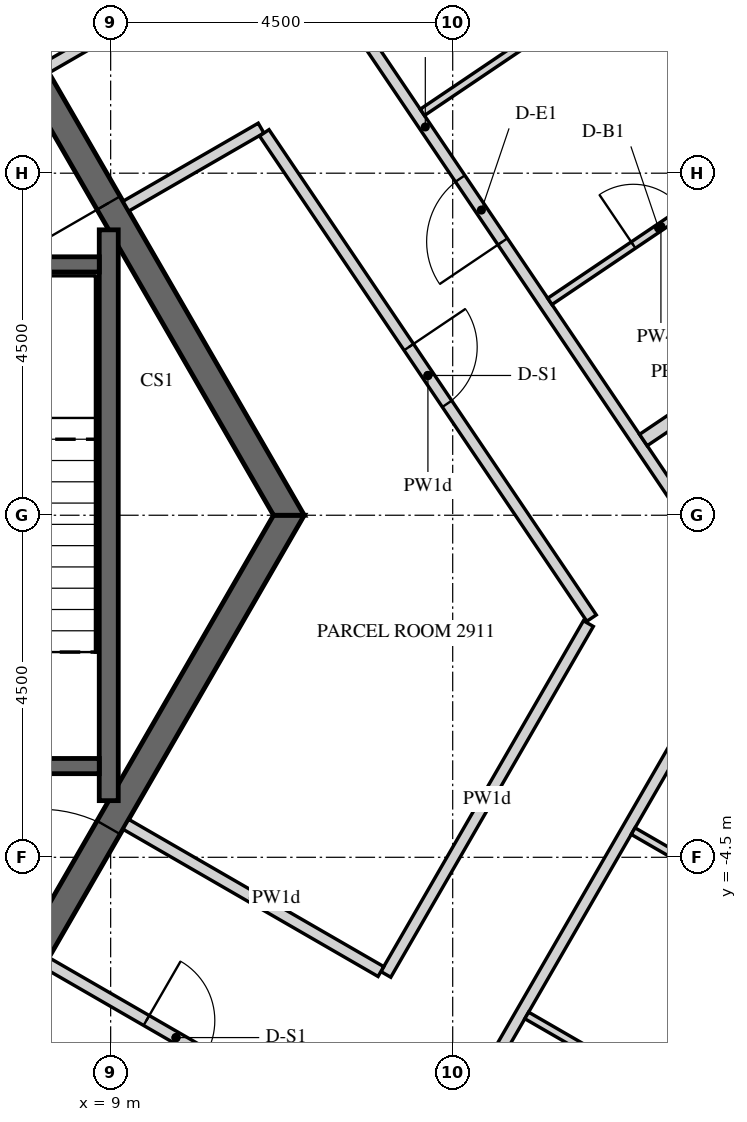
"""IFC4 building model, lengths in metres.
Left out: names, types, materials, properties, quantities, classifications, styles, units other than length and angle.
Written with IfcOpenShell. Run it as: python <this file> out.ifc"""

import sys

from ifc_helpers import new_model, si_unit, direction, frame, frame_2d, origin, place, context, subcontext, project, spatial, polyline, rectangle, outline, extrude, element, fill, save


model = new_model("IFC4")
c1 = context("Model", 3, precision=1e-05, world=origin(), true_north=direction((0.0, 1.0)))
c2 = subcontext(c1, "Body", "Model", "MODEL_VIEW")
j1 = project(units=[si_unit("LENGTHUNIT", "METRE"), si_unit("PLANEANGLEUNIT", "RADIAN")], contexts=[c1])
p1 = place(None, origin())
s1 = spatial("IfcSite", under=j1, at=p1, CompositionType="ELEMENT")
p2 = place(p1, origin())
s2 = spatial("IfcBuilding", under=s1, at=p2, CompositionType="ELEMENT")
p3 = place(p2, frame((0.0, 0.0, 372.9)))
s3 = spatial("IfcBuildingStorey", under=s2, at=p3, CompositionType="ELEMENT", Elevation=372.9)
p4 = place(p3, frame((15.273, -21.097, -0.15), z_axis=(0.0, 0.0, 1.0), x_axis=(0.499997453958, 0.866026873738, 0.0)))
e1 = element("IfcWall", 1, at=p4, inside=s3, PredefinedType="SOLIDWALL", context=c2, shape_type="SweptSolid", body=[
    extrude(outline(polyline([(-0.018, -0.225), (23.152, -0.225), (23.11, 0.225), (0.018, 0.225), (-0.018, -0.225)])), origin(), (0.0, 0.0, 1.0), 3.55),
])
p5 = place(p4, frame((1.366, 0.0, 0.45)))
e2 = element("IfcOpeningElement", 2, at=p5, cuts=e1, PredefinedType="OPENING", context=c2, shape_type="SweptSolid", body=[
    extrude(rectangle(XDim=2.4, YDim=3.0, at=frame_2d((1.2, 1.5))), frame((0.0, 0.235, 0.0), z_axis=(0.0, -1.0, 0.0), x_axis=(1.0, 0.0, 0.0)), (0.0, 0.0, 1.0), 0.47),
])
p6 = place(p4, frame((4.966, 0.0, 0.45)))
e3 = element("IfcOpeningElement", 3, at=p6, cuts=e1, PredefinedType="OPENING", context=c2, shape_type="SweptSolid", body=[
    extrude(rectangle(XDim=2.4, YDim=3.0, at=frame_2d((1.2, 1.5))), frame((0.0, 0.235, 0.0), z_axis=(0.0, -1.0, 0.0), x_axis=(1.0, 0.0, 0.0)), (0.0, 0.0, 1.0), 0.47),
])
p7 = place(p4, frame((8.566, 0.0, 0.45)))
e4 = element("IfcOpeningElement", 4, at=p7, cuts=e1, PredefinedType="OPENING", context=c2, shape_type="SweptSolid", body=[
    extrude(rectangle(XDim=2.4, YDim=3.0, at=frame_2d((1.2, 1.5))), frame((0.0, 0.235, 0.0), z_axis=(0.0, -1.0, 0.0), x_axis=(1.0, 0.0, 0.0)), (0.0, 0.0, 1.0), 0.47),
])
p8 = place(p4, frame((12.166, 0.0, 0.45)))
e5 = element("IfcOpeningElement", 5, at=p8, cuts=e1, PredefinedType="OPENING", context=c2, shape_type="SweptSolid", body=[
    extrude(rectangle(XDim=2.4, YDim=3.0, at=frame_2d((1.2, 1.5))), frame((0.0, 0.235, 0.0), z_axis=(0.0, -1.0, 0.0), x_axis=(1.0, 0.0, 0.0)), (0.0, 0.0, 1.0), 0.47),
])
p9 = place(p4, frame((15.766, 0.0, 0.45)))
e6 = element("IfcOpeningElement", 6, at=p9, cuts=e1, PredefinedType="OPENING", context=c2, shape_type="SweptSolid", body=[
    extrude(rectangle(XDim=2.4, YDim=3.0, at=frame_2d((1.2, 1.5))), frame((0.0, 0.235, 0.0), z_axis=(0.0, -1.0, 0.0), x_axis=(1.0, 0.0, 0.0)), (0.0, 0.0, 1.0), 0.47),
])
p10 = place(p4, frame((19.366, 0.0, 0.45)))
e7 = element("IfcOpeningElement", 7, at=p10, cuts=e1, PredefinedType="OPENING", context=c2, shape_type="SweptSolid", body=[
    extrude(rectangle(XDim=2.4, YDim=3.0, at=frame_2d((1.2, 1.5))), frame((0.0, 0.235, 0.0), z_axis=(0.0, -1.0, 0.0), x_axis=(1.0, 0.0, 0.0)), (0.0, 0.0, 1.0), 0.47),
])
p11 = place(p3, frame((24.37, 2.811, -0.15), z_axis=(0.0, 0.0, 1.0), x_axis=(-0.559187034749, 0.829041531027, 0.0)))
e8 = element("IfcWall", 8, at=p11, inside=s3, PredefinedType="SOLIDWALL", context=c2, shape_type="SweptSolid", body=[
    extrude(outline(polyline([(0.225, -0.225), (20.506, -0.225), (20.957, 0.225), (-0.225, 0.225), (0.225, -0.225)])), origin(), (0.0, 0.0, 1.0), 3.55),
])
p12 = place(p11, frame((0.325, 0.0, 1.05)))
e9 = element("IfcOpeningElement", 9, at=p12, cuts=e8, PredefinedType="OPENING", context=c2, shape_type="SweptSolid", body=[
    extrude(rectangle(XDim=0.9, YDim=1.5, at=frame_2d((0.45, 0.75))), frame((0.0, 0.235, 0.0), z_axis=(0.0, -1.0, 0.0), x_axis=(1.0, 0.0, 0.0)), (0.0, 0.0, 1.0), 0.47),
])
p13 = place(p11, frame((1.525, 0.0, 0.15)))
e10 = element("IfcOpeningElement", 10, at=p13, cuts=e8, PredefinedType="OPENING", context=c2, shape_type="SweptSolid", body=[
    extrude(rectangle(XDim=1.2, YDim=2.4, at=frame_2d((0.6, 1.2))), frame((0.0, 0.235, 0.0), z_axis=(0.0, -1.0, 0.0), x_axis=(1.0, 0.0, 0.0)), (0.0, 0.0, 1.0), 0.47),
])
p14 = place(p11, frame((3.766, 0.0, 1.05)))
e11 = element("IfcOpeningElement", 11, at=p14, cuts=e8, PredefinedType="OPENING", context=c2, shape_type="SweptSolid", body=[
    extrude(rectangle(XDim=0.9, YDim=1.5, at=frame_2d((0.45, 0.75))), frame((0.0, 0.235, 0.0), z_axis=(0.0, -1.0, 0.0), x_axis=(1.0, 0.0, 0.0)), (0.0, 0.0, 1.0), 0.47),
])
p15 = place(p11, frame((4.966, 0.0, 0.15)))
e12 = element("IfcOpeningElement", 12, at=p15, cuts=e8, PredefinedType="OPENING", context=c2, shape_type="SweptSolid", body=[
    extrude(rectangle(XDim=1.2, YDim=2.4, at=frame_2d((0.6, 1.2))), frame((0.0, 0.235, 0.0), z_axis=(0.0, -1.0, 0.0), x_axis=(1.0, 0.0, 0.0)), (0.0, 0.0, 1.0), 0.47),
])
p16 = place(p11, frame((7.366, 0.0, 1.05)))
e13 = element("IfcOpeningElement", 13, at=p16, cuts=e8, PredefinedType="OPENING", context=c2, shape_type="SweptSolid", body=[
    extrude(rectangle(XDim=0.9, YDim=1.5, at=frame_2d((0.45, 0.75))), frame((0.0, 0.235, 0.0), z_axis=(0.0, -1.0, 0.0), x_axis=(1.0, 0.0, 0.0)), (0.0, 0.0, 1.0), 0.47),
])
p17 = place(p11, frame((8.566, 0.0, 0.15)))
e14 = element("IfcOpeningElement", 14, at=p17, cuts=e8, PredefinedType="OPENING", context=c2, shape_type="SweptSolid", body=[
    extrude(rectangle(XDim=1.2, YDim=2.4, at=frame_2d((0.6, 1.2))), frame((0.0, 0.235, 0.0), z_axis=(0.0, -1.0, 0.0), x_axis=(1.0, 0.0, 0.0)), (0.0, 0.0, 1.0), 0.47),
])
p18 = place(p11, frame((10.966, 0.0, 1.05)))
e15 = element("IfcOpeningElement", 15, at=p18, cuts=e8, PredefinedType="OPENING", context=c2, shape_type="SweptSolid", body=[
    extrude(rectangle(XDim=0.9, YDim=1.5, at=frame_2d((0.45, 0.75))), frame((0.0, 0.235, 0.0), z_axis=(0.0, -1.0, 0.0), x_axis=(1.0, 0.0, 0.0)), (0.0, 0.0, 1.0), 0.47),
])
p19 = place(p11, frame((12.166, 0.0, 0.15)))
e16 = element("IfcOpeningElement", 16, at=p19, cuts=e8, PredefinedType="OPENING", context=c2, shape_type="SweptSolid", body=[
    extrude(rectangle(XDim=1.2, YDim=2.4, at=frame_2d((0.6, 1.2))), frame((0.0, 0.235, 0.0), z_axis=(0.0, -1.0, 0.0), x_axis=(1.0, 0.0, 0.0)), (0.0, 0.0, 1.0), 0.47),
])
p20 = place(p11, frame((14.566, 0.0, 1.05)))
e17 = element("IfcOpeningElement", 17, at=p20, cuts=e8, PredefinedType="OPENING", context=c2, shape_type="SweptSolid", body=[
    extrude(rectangle(XDim=0.9, YDim=1.5, at=frame_2d((0.45, 0.75))), frame((0.0, 0.235, 0.0), z_axis=(0.0, -1.0, 0.0), x_axis=(1.0, 0.0, 0.0)), (0.0, 0.0, 1.0), 0.47),
])
p21 = place(p11, frame((15.766, 0.0, 0.15)))
e18 = element("IfcOpeningElement", 18, at=p21, cuts=e8, PredefinedType="OPENING", context=c2, shape_type="SweptSolid", body=[
    extrude(rectangle(XDim=1.2, YDim=2.4, at=frame_2d((0.6, 1.2))), frame((0.0, 0.235, 0.0), z_axis=(0.0, -1.0, 0.0), x_axis=(1.0, 0.0, 0.0)), (0.0, 0.0, 1.0), 0.47),
])
p22 = place(p11, frame((18.007, 0.0, 1.05)))
e19 = element("IfcOpeningElement", 19, at=p22, cuts=e8, PredefinedType="OPENING", context=c2, shape_type="SweptSolid", body=[
    extrude(rectangle(XDim=0.9, YDim=1.5, at=frame_2d((0.45, 0.75))), frame((0.0, 0.235, 0.0), z_axis=(0.0, -1.0, 0.0), x_axis=(1.0, 0.0, 0.0)), (0.0, 0.0, 1.0), 0.47),
])
p23 = place(p11, frame((19.207, 0.0, 0.15)))
e20 = element("IfcOpeningElement", 20, at=p23, cuts=e8, PredefinedType="OPENING", context=c2, shape_type="SweptSolid", body=[
    extrude(rectangle(XDim=1.2, YDim=2.4, at=frame_2d((0.6, 1.2))), frame((0.0, 0.235, 0.0), z_axis=(0.0, -1.0, 0.0), x_axis=(1.0, 0.0, 0.0)), (0.0, 0.0, 1.0), 0.47),
])
p24 = place(p3, frame((5.673, -9.825, -0.15), z_axis=(0.0, 0.0, 1.0), x_axis=(0.499995046907, 0.866028263435, 0.0)))
e21 = element("IfcWall", 21, at=p24, inside=s3, PredefinedType="SHEAR", context=c2, shape_type="SweptSolid", body=[
    extrude(outline(polyline([(-0.101, -0.175), (11.446, -0.175), (11.244, 0.175), (0.101, 0.175), (-0.101, -0.175)])), origin(), (0.0, 0.0, 1.0), 3.55),
])
p25 = place(p24, frame((4.801, 0.0, 0.15)))
e22 = element("IfcOpeningElement", 22, at=p25, cuts=e21, PredefinedType="OPENING", context=c2, shape_type="SweptSolid", body=[
    extrude(rectangle(XDim=1.8, YDim=2.4, at=frame_2d((0.9, 1.2))), frame((0.0, 0.185, 0.0), z_axis=(0.0, -1.0, 0.0), x_axis=(1.0, 0.0, 0.0)), (0.0, 0.0, 1.0), 0.37),
])
p26 = place(p3, frame((11.345, 0.0, -0.15), z_axis=(0.0, 0.0, 1.0), x_axis=(-0.499995046907, 0.866028263435, 0.0)))
e23 = element("IfcWall", 23, at=p26, inside=s3, PredefinedType="SHEAR", context=c2, shape_type="SweptSolid", body=[
    extrude(outline(polyline([(-0.101, -0.175), (11.446, -0.175), (11.244, 0.175), (0.101, 0.175), (-0.101, -0.175)])), origin(), (0.0, 0.0, 1.0), 3.55),
])
p27 = place(p26, frame((4.744, 0.0, 0.15)))
e24 = element("IfcOpeningElement", 24, at=p27, cuts=e23, PredefinedType="OPENING", context=c2, shape_type="SweptSolid", body=[
    extrude(rectangle(XDim=1.8, YDim=2.4, at=frame_2d((0.9, 1.2))), frame((0.0, 0.185, 0.0), z_axis=(0.0, -1.0, 0.0), x_axis=(1.0, 0.0, 0.0)), (0.0, 0.0, 1.0), 0.37),
])
p28 = place(p3, frame((8.975, -3.755, -0.25), z_axis=(0.0, 0.0, 1.0), x_axis=(0.0, 1.0, 0.0)))
e25 = element("IfcWall", 25, at=p28, inside=s3, PredefinedType="SHEAR", context=c2, shape_type="SweptSolid", body=[
    extrude(rectangle(XDim=7.51, YDim=0.25, at=frame_2d((3.755, 0.0))), origin(), (0.0, 0.0, 1.0), 3.9),
])
p29 = place(p3, frame((5.9, 3.3, -0.25), z_axis=(0.0, 0.0, 1.0), x_axis=(1.0, 0.0, 0.0)))
e26 = element("IfcWall", 26, at=p29, inside=s3, PredefinedType="SHEAR", context=c2, shape_type="SweptSolid", body=[
    extrude(rectangle(XDim=2.95, YDim=0.2, at=frame_2d((1.475, 0.0))), origin(), (0.0, 0.0, 1.0), 3.9),
])
p30 = place(p3, frame((5.9, -3.3, -0.25), z_axis=(0.0, 0.0, 1.0), x_axis=(1.0, 0.0, 0.0)))
e27 = element("IfcWall", 27, at=p30, inside=s3, PredefinedType="SHEAR", context=c2, shape_type="SweptSolid", body=[
    extrude(rectangle(XDim=2.95, YDim=0.2, at=frame_2d((1.475, 0.0))), origin(), (0.0, 0.0, 1.0), 3.9),
])
p31 = place(p30, frame((0.875, 0.0, 0.25)))
e28 = element("IfcOpeningElement", 28, at=p31, cuts=e27, PredefinedType="OPENING", context=c2, shape_type="SweptSolid", body=[
    extrude(rectangle(XDim=1.2, YDim=2.4, at=frame_2d((0.6, 1.2))), frame((0.0, 0.11, 0.0), z_axis=(0.0, -1.0, 0.0), x_axis=(1.0, 0.0, 0.0)), (0.0, 0.0, 1.0), 0.22),
])
p32 = place(p3, frame((10.697, -12.973, 0.0), z_axis=(0.0, 0.0, 1.0), x_axis=(0.499991115059, 0.866030533446, 0.0)))
e29 = element("IfcWall", 29, at=p32, inside=s3, PredefinedType="PARTITIONING", context=c2, shape_type="SweptSolid", body=[
    extrude(rectangle(XDim=13.504, YDim=0.15, at=frame_2d((6.752, 0.0))), origin(), (0.0, 0.0, 1.0), 2.47),
])
p33 = place(p32, frame((3.175, 0.0, 0.0)))
e30 = element("IfcOpeningElement", 30, at=p33, cuts=e29, PredefinedType="OPENING", context=c2, shape_type="SweptSolid", body=[
    extrude(rectangle(XDim=1.0, YDim=2.1, at=frame_2d((0.5, 1.05))), frame((0.0, 0.085, 0.0), z_axis=(0.0, -1.0, 0.0), x_axis=(1.0, 0.0, 0.0)), (0.0, 0.0, 1.0), 0.17),
])
p34 = place(p3, frame((17.401, -1.21, 0.0), z_axis=(0.0, 0.0, 1.0), x_axis=(-0.559186729505, 0.829041736914, 0.0)))
e31 = element("IfcWall", 31, at=p34, inside=s3, PredefinedType="PARTITIONING", context=c2, shape_type="SweptSolid", body=[
    extrude(rectangle(XDim=15.243, YDim=0.15, at=frame_2d((7.621, 0.0))), origin(), (0.0, 0.0, 1.0), 2.47),
])
p35 = place(p34, frame((5.802, 0.0, 0.0)))
e32 = element("IfcOpeningElement", 32, at=p35, cuts=e31, PredefinedType="OPENING", context=c2, shape_type="SweptSolid", body=[
    extrude(rectangle(XDim=1.0, YDim=2.1, at=frame_2d((0.5, 1.05))), frame((0.0, 0.085, 0.0), z_axis=(0.0, -1.0, 0.0), x_axis=(1.0, 0.0, 0.0)), (0.0, 0.0, 1.0), 0.17),
])
p36 = place(p3, frame((9.2, 4.066, 0.0), z_axis=(0.0, 0.0, 1.0), x_axis=(0.866011447264, 0.500024172624, 0.0)))
e33 = element("IfcWall", 33, at=p36, inside=s3, PredefinedType="PARTITIONING", context=c2, shape_type="SweptSolid", body=[
    extrude(rectangle(XDim=2.055, YDim=0.15, at=frame_2d((1.027, 0.0))), origin(), (0.0, 0.0, 1.0), 2.47),
])
p37 = place(p3, frame((11.021, 5.031, 0.0), z_axis=(0.0, 0.0, 1.0), x_axis=(0.559191842266, -0.829038288346, 0.0)))
e34 = element("IfcWall", 34, at=p37, inside=s3, PredefinedType="PARTITIONING", context=c2, shape_type="SweptSolid", body=[
    extrude(rectangle(XDim=7.7, YDim=0.15, at=frame_2d((3.85, 0.0))), origin(), (0.0, 0.0, 1.0), 2.47),
])
p38 = place(p37, frame((3.4, 0.0, 0.0)))
e35 = element("IfcOpeningElement", 35, at=p38, cuts=e34, PredefinedType="OPENING", context=c2, shape_type="SweptSolid", body=[
    extrude(rectangle(XDim=0.9, YDim=2.1, at=frame_2d((0.45, 1.05))), frame((0.0, 0.085, 0.0), z_axis=(0.0, -1.0, 0.0), x_axis=(1.0, 0.0, 0.0)), (0.0, 0.0, 1.0), 0.17),
])
p39 = place(p3, frame((15.285, -1.425, 0.0), z_axis=(0.0, 0.0, 1.0), x_axis=(-0.499972278664, -0.866041408113, 0.0)))
e36 = element("IfcWall", 36, at=p39, inside=s3, PredefinedType="PARTITIONING", context=c2, shape_type="SweptSolid", body=[
    extrude(rectangle(XDim=5.329, YDim=0.15, at=frame_2d((2.665, 0.0))), origin(), (0.0, 0.0, 1.0), 2.47),
])
p40 = place(p3, frame((12.555, -6.003, 0.0), z_axis=(0.0, 0.0, 1.0), x_axis=(-0.866016658288, 0.500015147339, 0.0)))
e37 = element("IfcWall", 37, at=p40, inside=s3, PredefinedType="PARTITIONING", context=c2, shape_type="SweptSolid", body=[
    extrude(rectangle(XDim=3.875, YDim=0.15, at=frame_2d((1.938, 0.0))), origin(), (0.0, 0.0, 1.0), 2.47),
])
p41 = place(p3, frame((8.15, -5.884, 0.0), z_axis=(0.0, 0.0, 1.0), x_axis=(0.866020906874, -0.500007788796, 0.0)))
e38 = element("IfcWall", 38, at=p41, inside=s3, PredefinedType="PARTITIONING", context=c2, shape_type="SweptSolid", body=[
    extrude(rectangle(XDim=3.95, YDim=0.15, at=frame_2d((1.975, 0.0))), origin(), (0.0, 0.0, 1.0), 2.47),
])
p42 = place(p41, frame((1.525, 0.0, 0.0)))
e39 = element("IfcOpeningElement", 39, at=p42, cuts=e38, PredefinedType="OPENING", context=c2, shape_type="SweptSolid", body=[
    extrude(rectangle(XDim=0.9, YDim=2.1, at=frame_2d((0.45, 1.05))), frame((0.0, 0.085, 0.0), z_axis=(0.0, -1.0, 0.0), x_axis=(1.0, 0.0, 0.0)), (0.0, 0.0, 1.0), 0.17),
])
p43 = place(p3, frame((9.737, 6.801, 0.0), z_axis=(0.0, 0.0, 1.0), x_axis=(-0.866045829247, -0.499964620392, 0.0)))
e40 = element("IfcWall", 40, at=p43, inside=s3, PredefinedType="PARTITIONING", context=c2, shape_type="SweptSolid", body=[
    extrude(rectangle(XDim=1.833, YDim=0.15, at=frame_2d((0.917, 0.0))), origin(), (0.0, 0.0, 1.0), 2.47),
])
p44 = place(p3, frame((15.874, -4.156, 0.0), z_axis=(0.0, 0.0, 1.0), x_axis=(0.866031034943, -0.499990246421, 0.0)))
e41 = element("IfcWall", 41, at=p44, inside=s3, PredefinedType="PARTITIONING", context=c2, shape_type="SweptSolid", body=[
    extrude(rectangle(XDim=3.525, YDim=0.1, at=frame_2d((1.762, 0.0))), origin(), (0.0, 0.0, 1.0), 2.47),
])
p45 = place(p3, frame((22.413, 5.309, 0.0), z_axis=(0.0, 0.0, 1.0), x_axis=(-0.82903328576, -0.559199258853, 0.0)))
e42 = element("IfcWall", 42, at=p45, inside=s3, PredefinedType="PARTITIONING", context=c2, shape_type="SweptSolid", body=[
    extrude(rectangle(XDim=7.725, YDim=0.18, at=frame_2d((3.863, 0.0))), origin(), (0.0, 0.0, 1.0), 2.47),
])
p46 = place(p3, frame((17.483, -8.318, 0.0), z_axis=(0.0, 0.0, 1.0), x_axis=(-0.866025305473, 0.500000170281, 0.0)))
e43 = element("IfcWall", 43, at=p46, inside=s3, PredefinedType="PARTITIONING", context=c2, shape_type="SweptSolid", body=[
    extrude(rectangle(XDim=3.475, YDim=0.1, at=frame_2d((1.738, 0.0))), origin(), (0.0, 0.0, 1.0), 2.47),
])
p47 = place(p3, frame((14.485, 9.552, 0.0), z_axis=(0.0, 0.0, 1.0), x_axis=(0.559171259418, -0.829052171242, 0.0)))
e44 = element("IfcWall", 44, at=p47, inside=s3, PredefinedType="PARTITIONING", context=c2, shape_type="SweptSolid", body=[
    extrude(rectangle(XDim=4.352, YDim=0.1, at=frame_2d((2.176, 0.0))), origin(), (0.0, 0.0, 1.0), 2.47),
])
p48 = place(p47, frame((2.95, 0.0, 0.0)))
e45 = element("IfcOpeningElement", 45, at=p48, cuts=e44, PredefinedType="OPENING", context=c2, shape_type="SweptSolid", body=[
    extrude(rectangle(XDim=0.9, YDim=2.1, at=frame_2d((0.45, 1.05))), frame((0.0, 0.06, 0.0), z_axis=(0.0, -1.0, 0.0), x_axis=(1.0, 0.0, 0.0)), (0.0, 0.0, 1.0), 0.12),
])
p49 = place(p47, frame((0.9, 0.0, 0.0)))
e46 = element("IfcOpeningElement", 46, at=p49, cuts=e44, PredefinedType="OPENING", context=c2, shape_type="SweptSolid", body=[
    extrude(rectangle(XDim=0.9, YDim=2.1, at=frame_2d((0.45, 1.05))), frame((0.0, 0.06, 0.0), z_axis=(0.0, -1.0, 0.0), x_axis=(1.0, 0.0, 0.0)), (0.0, 0.0, 1.0), 0.12),
])
p50 = place(p3, frame((14.778, 2.813, 0.0), z_axis=(0.0, 0.0, 1.0), x_axis=(0.829033300448, 0.559199237078, 0.0)))
e47 = element("IfcWall", 47, at=p50, inside=s3, PredefinedType="PARTITIONING", context=c2, shape_type="SweptSolid", body=[
    extrude(rectangle(XDim=3.525, YDim=0.1, at=frame_2d((1.763, 0.0))), origin(), (0.0, 0.0, 1.0), 2.47),
])
p51 = place(p50, frame((1.325, 0.0, 0.0)))
e48 = element("IfcOpeningElement", 48, at=p51, cuts=e47, PredefinedType="OPENING", context=c2, shape_type="SweptSolid", body=[
    extrude(rectangle(XDim=0.8, YDim=2.1, at=frame_2d((0.4, 1.05))), frame((0.0, 0.06, 0.0), z_axis=(0.0, -1.0, 0.0), x_axis=(1.0, 0.0, 0.0)), (0.0, 0.0, 1.0), 0.12),
])
p52 = place(p3, frame((15.982, 7.244, 0.0), z_axis=(0.0, 0.0, 1.0), x_axis=(-0.829044102949, -0.559183221642, 0.0)))
e49 = element("IfcWall", 49, at=p52, inside=s3, PredefinedType="PARTITIONING", context=c2, shape_type="SweptSolid", body=[
    extrude(rectangle(XDim=3.475, YDim=0.1, at=frame_2d((1.737, 0.0))), origin(), (0.0, 0.0, 1.0), 2.47),
])
p53 = place(p27, origin())
e50 = element("IfcDoor", 50, at=p53, inside=s3, OperationType="DOUBLE_DOOR_SINGLE_SWING", PredefinedType="DOOR", context=c2, shape_type="SweptSolid", body=[
    extrude(rectangle(XDim=1.8, YDim=2.4, at=frame_2d((0.9, 1.2))), frame((0.0, 0.025, 0.0), z_axis=(0.0, -1.0, 0.0), x_axis=(1.0, 0.0, 0.0)), (0.0, 0.0, 1.0), 0.05),
])
fill(e24, e50)
p54 = place(p25, origin())
e51 = element("IfcDoor", 51, at=p54, inside=s3, OperationType="DOUBLE_DOOR_SINGLE_SWING", PredefinedType="DOOR", context=c2, shape_type="SweptSolid", body=[
    extrude(rectangle(XDim=1.8, YDim=2.4, at=frame_2d((0.9, 1.2))), frame((0.0, 0.025, 0.0), z_axis=(0.0, -1.0, 0.0), x_axis=(1.0, 0.0, 0.0)), (0.0, 0.0, 1.0), 0.05),
])
fill(e22, e51)
p55 = place(p35, origin())
e52 = element("IfcDoor", 52, at=p55, inside=s3, OperationType="SINGLE_SWING_RIGHT", PredefinedType="DOOR", context=c2, shape_type="SweptSolid", body=[
    extrude(rectangle(XDim=1.0, YDim=2.1, at=frame_2d((0.5, 1.05))), frame((0.0, 0.025, 0.0), z_axis=(0.0, -1.0, 0.0), x_axis=(1.0, 0.0, 0.0)), (0.0, 0.0, 1.0), 0.05),
])
fill(e32, e52)
p56 = place(p51, origin())
e53 = element("IfcDoor", 53, at=p56, inside=s3, OperationType="SINGLE_SWING_RIGHT", PredefinedType="DOOR", context=c2, shape_type="SweptSolid", body=[
    extrude(rectangle(XDim=0.8, YDim=2.1, at=frame_2d((0.4, 1.05))), frame((0.0, 0.025, 0.0), z_axis=(0.0, -1.0, 0.0), x_axis=(1.0, 0.0, 0.0)), (0.0, 0.0, 1.0), 0.05),
])
fill(e48, e53)
p57 = place(p38, origin())
e54 = element("IfcDoor", 54, at=p57, inside=s3, OperationType="SINGLE_SWING_LEFT", PredefinedType="DOOR", context=c2, shape_type="SweptSolid", body=[
    extrude(rectangle(XDim=0.9, YDim=2.1, at=frame_2d((0.45, 1.05))), frame((0.0, 0.025, 0.0), z_axis=(0.0, -1.0, 0.0), x_axis=(1.0, 0.0, 0.0)), (0.0, 0.0, 1.0), 0.05),
])
fill(e35, e54)
p58 = place(p42, origin())
e55 = element("IfcDoor", 55, at=p58, inside=s3, OperationType="SINGLE_SWING_LEFT", PredefinedType="DOOR", context=c2, shape_type="SweptSolid", body=[
    extrude(rectangle(XDim=0.9, YDim=2.1, at=frame_2d((0.45, 1.05))), frame((0.0, 0.025, 0.0), z_axis=(0.0, -1.0, 0.0), x_axis=(1.0, 0.0, 0.0)), (0.0, 0.0, 1.0), 0.05),
])
fill(e39, e55)
save(model, sys.argv[1])
